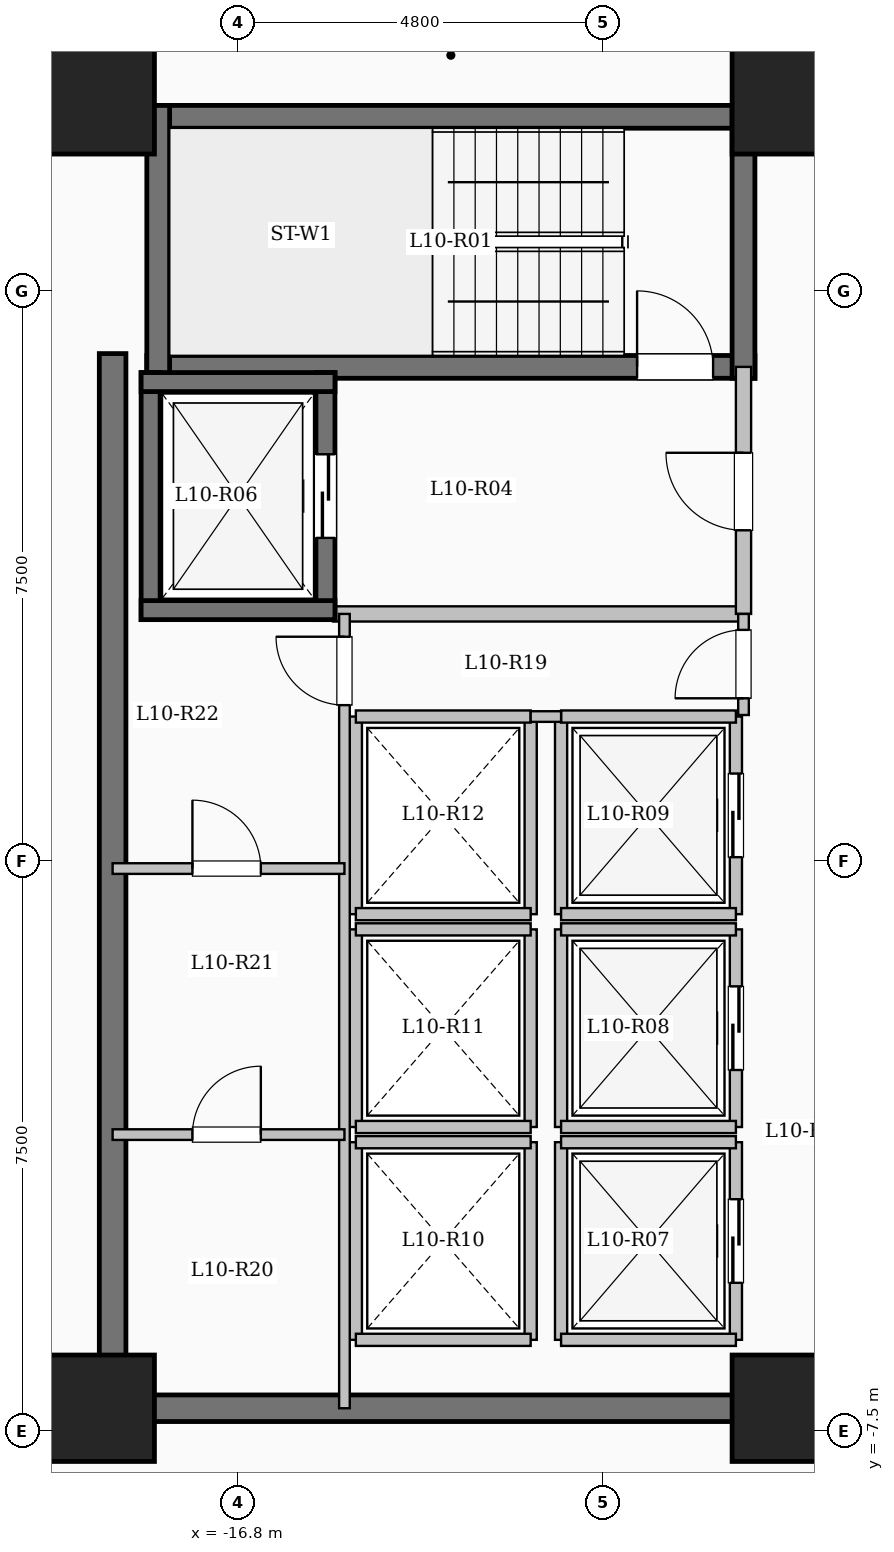
"""IFC4 building model, lengths in metres.
Left out: names, types, materials, properties, quantities, classifications, styles, units other than length and angle.
Written with IfcOpenShell. Run it as: python <this file> out.ifc"""

import sys

from ifc_helpers import new_model, si_unit, direction, frame, frame_2d, origin, origin_2d, place, context, subcontext, project, spatial, rectangle, extrude, element, fill, save


model = new_model("IFC4")
c1 = context("Model", 3, precision=1e-05, world=origin(), true_north=direction((0.0, 1.0)))
c2 = subcontext(c1, "Body", "Model", "MODEL_VIEW")
j1 = project(units=[si_unit("LENGTHUNIT", "METRE"), si_unit("PLANEANGLEUNIT", "RADIAN")], contexts=[c1])
p1 = place(None, origin())
s1 = spatial("IfcSite", under=j1, at=p1, CompositionType="ELEMENT")
p2 = place(p1, origin())
s2 = spatial("IfcBuilding", under=s1, at=p2, CompositionType="ELEMENT")
p3 = place(p2, frame((0.0, 0.0, 40.75)))
s3 = spatial("IfcBuildingStorey", under=s2, at=p3, CompositionType="ELEMENT", Elevation=40.75)
for number, where, z_axis, x_axis in (
    (1, (-9.6, -7.2, 0.0), (0.0, 0.0, 1.0), (1.0, 0.0, 0.0)),
    (2, (-9.6, 10.0, 0.0), (0.0, 0.0, 1.0), (1.0, 0.0, 0.0)),
    (3, (-18.6, -7.2, 0.0), (0.0, 0.0, 1.0), (1.0, 0.0, 0.0)),
    (4, (-18.6, 10.0, 0.0), (0.0, 0.0, 1.0), (1.0, 0.0, 0.0)),
):
    element("IfcColumn", number, at=place(p3, frame(where, z_axis=z_axis, x_axis=x_axis)), inside=s3, PredefinedType="COLUMN", context=c2, shape_type="SweptSolid", body=[
        extrude(rectangle(XDim=1.4, YDim=1.4, at=origin_2d()), origin(), (0.0, 0.0, 1.0), 3.35),
    ])
p4 = place(p3, frame((-18.0, 9.79, 0.0), z_axis=(0.0, 0.0, 1.0), x_axis=(1.0, 0.0, 0.0)))
e5 = element("IfcWall", 5, at=p4, inside=s3, PredefinedType="SHEAR", context=c2, shape_type="SweptSolid", body=[
    extrude(rectangle(XDim=8.0, YDim=0.3, at=frame_2d((4.0, 0.0))), origin(), (0.0, 0.0, 1.0), 3.35),
])
p5 = place(p3, frame((-18.0, 6.5, 0.0), z_axis=(0.0, 0.0, 1.0), x_axis=(1.0, 0.0, 0.0)))
e6 = element("IfcWall", 6, at=p5, inside=s3, PredefinedType="SHEAR", context=c2, shape_type="SweptSolid", body=[
    extrude(rectangle(XDim=8.0, YDim=0.3, at=frame_2d((4.0, 0.0))), origin(), (0.0, 0.0, 1.0), 3.35),
])
p6 = place(p5, frame((6.45, 0.0, 0.0)))
e7 = element("IfcOpeningElement", 7, at=p6, cuts=e6, PredefinedType="OPENING", context=c2, shape_type="SweptSolid", body=[
    extrude(rectangle(XDim=1.0, YDim=2.15, at=frame_2d((0.5, 1.075))), frame((0.0, 0.16, 0.0), z_axis=(0.0, -1.0, 0.0), x_axis=(1.0, 0.0, 0.0)), (0.0, 0.0, 1.0), 0.32),
])
for number, where, z_axis, x_axis in (
    (8, (-17.85, 6.35, 0.0), (0.0, 0.0, 1.0), (0.0, 1.0, 0.0)),
    (9, (-10.15, 6.35, 0.0), (0.0, 0.0, 1.0), (0.0, 1.0, 0.0)),
):
    element("IfcWall", number, at=place(p3, frame(where, z_axis=z_axis, x_axis=x_axis)), inside=s3, PredefinedType="SHEAR", context=c2, shape_type="SweptSolid", body=[
        extrude(rectangle(XDim=3.59, YDim=0.3, at=frame_2d((1.795, 0.0))), origin(), (0.0, 0.0, 1.0), 3.35),
    ])
p7 = place(p3, frame((-15.55, 3.25, 0.0), z_axis=(0.0, 0.0, 1.0), x_axis=(1.0, 0.0, 0.0)))
e10 = element("IfcWall", 10, at=p7, inside=s3, PredefinedType="SOLIDWALL", context=c2, shape_type="SweptSolid", body=[
    extrude(rectangle(XDim=5.4, YDim=0.2, at=frame_2d((2.7, 0.0))), origin(), (0.0, 0.0, 1.0), 3.1),
])
p8 = place(p3, frame((-10.15, 3.25, 0.0), z_axis=(0.0, 0.0, 1.0), x_axis=(0.0, 1.0, 0.0)))
e11 = element("IfcWall", 11, at=p8, inside=s3, PredefinedType="SOLIDWALL", context=c2, shape_type="SweptSolid", body=[
    extrude(rectangle(XDim=3.25, YDim=0.2, at=frame_2d((1.625, 0.0))), origin(), (0.0, 0.0, 1.0), 3.1),
])
p9 = place(p8, frame((1.1, 0.0, 0.0)))
e12 = element("IfcOpeningElement", 12, at=p9, cuts=e11, PredefinedType="OPENING", context=c2, shape_type="SweptSolid", body=[
    extrude(rectangle(XDim=1.02, YDim=2.15, at=frame_2d((0.51, 1.075))), frame((0.0, 0.11, 0.0), z_axis=(0.0, -1.0, 0.0), x_axis=(1.0, 0.0, 0.0)), (0.0, 0.0, 1.0), 0.22),
])
p10 = place(p3, frame((-17.95, 3.175, 0.0), z_axis=(0.0, 0.0, 1.0), x_axis=(0.0, 1.0, 0.0)))
e13 = element("IfcWall", 13, at=p10, inside=s3, PredefinedType="SHEAR", context=c2, shape_type="SweptSolid", body=[
    extrude(rectangle(XDim=3.25, YDim=0.25, at=frame_2d((1.625, 0.0))), origin(), (0.0, 0.0, 1.0), 3.35),
])
p11 = place(p3, frame((-15.65, 3.175, 0.0), z_axis=(0.0, 0.0, 1.0), x_axis=(0.0, 1.0, 0.0)))
e14 = element("IfcWall", 14, at=p11, inside=s3, PredefinedType="SHEAR", context=c2, shape_type="SweptSolid", body=[
    extrude(rectangle(XDim=3.25, YDim=0.25, at=frame_2d((1.625, 0.0))), origin(), (0.0, 0.0, 1.0), 3.35),
])
p12 = place(p11, frame((1.075, 0.0, 0.0)))
e15 = element("IfcOpeningElement", 15, at=p12, cuts=e14, PredefinedType="OPENING", context=c2, shape_type="SweptSolid", body=[
    extrude(rectangle(XDim=1.1, YDim=2.15, at=frame_2d((0.55, 1.075))), frame((0.0, 0.135, 0.0), z_axis=(0.0, -1.0, 0.0), x_axis=(1.0, 0.0, 0.0)), (0.0, 0.0, 1.0), 0.27),
])
for number, where, z_axis, x_axis in (
    (16, (-18.075, 3.3, 0.0), (0.0, 0.0, 1.0), (1.0, 0.0, 0.0)),
    (17, (-18.075, 6.3, 0.0), (0.0, 0.0, 1.0), (1.0, 0.0, 0.0)),
):
    element("IfcWall", number, at=place(p3, frame(where, z_axis=z_axis, x_axis=x_axis)), inside=s3, PredefinedType="SHEAR", context=c2, shape_type="SweptSolid", body=[
        extrude(rectangle(XDim=2.55, YDim=0.25, at=frame_2d((1.275, 0.0))), origin(), (0.0, 0.0, 1.0), 3.35),
    ])
p13 = place(p3, frame((-12.55, -6.3, 0.0), z_axis=(0.0, 0.0, 1.0), x_axis=(0.0, 1.0, 0.0)))
e18 = element("IfcWall", 18, at=p13, inside=s3, PredefinedType="SOLIDWALL", context=c2, shape_type="SweptSolid", body=[
    extrude(rectangle(XDim=2.6, YDim=0.16, at=frame_2d((1.3, 0.0))), origin(), (0.0, 0.0, 1.0), 3.1),
])
p14 = place(p3, frame((-10.25, -6.3, 0.0), z_axis=(0.0, 0.0, 1.0), x_axis=(0.0, 1.0, 0.0)))
e19 = element("IfcWall", 19, at=p14, inside=s3, PredefinedType="SOLIDWALL", context=c2, shape_type="SweptSolid", body=[
    extrude(rectangle(XDim=2.6, YDim=0.16, at=frame_2d((1.3, 0.0))), origin(), (0.0, 0.0, 1.0), 3.1),
])
p15 = place(p14, frame((0.75, 0.0, 0.0)))
e20 = element("IfcOpeningElement", 20, at=p15, cuts=e19, PredefinedType="OPENING", context=c2, shape_type="SweptSolid", body=[
    extrude(rectangle(XDim=1.1, YDim=2.15, at=frame_2d((0.55, 1.075))), frame((0.0, 0.09, 0.0), z_axis=(0.0, -1.0, 0.0), x_axis=(1.0, 0.0, 0.0)), (0.0, 0.0, 1.0), 0.18),
])
for number, where, z_axis, x_axis in (
    (21, (-12.55, -6.3, 0.0), (0.0, 0.0, 1.0), (1.0, 0.0, 0.0)),
    (22, (-12.55, -3.7, 0.0), (0.0, 0.0, 1.0), (1.0, 0.0, 0.0)),
):
    element("IfcWall", number, at=place(p3, frame(where, z_axis=z_axis, x_axis=x_axis)), inside=s3, PredefinedType="SOLIDWALL", context=c2, shape_type="SweptSolid", body=[
        extrude(rectangle(XDim=2.3, YDim=0.16, at=frame_2d((1.15, 0.0))), origin(), (0.0, 0.0, 1.0), 3.1),
    ])
p16 = place(p3, frame((-12.55, -3.5, 0.0), z_axis=(0.0, 0.0, 1.0), x_axis=(0.0, 1.0, 0.0)))
e23 = element("IfcWall", 23, at=p16, inside=s3, PredefinedType="SOLIDWALL", context=c2, shape_type="SweptSolid", body=[
    extrude(rectangle(XDim=2.6, YDim=0.16, at=frame_2d((1.3, 0.0))), origin(), (0.0, 0.0, 1.0), 3.1),
])
p17 = place(p3, frame((-10.25, -3.5, 0.0), z_axis=(0.0, 0.0, 1.0), x_axis=(0.0, 1.0, 0.0)))
e24 = element("IfcWall", 24, at=p17, inside=s3, PredefinedType="SOLIDWALL", context=c2, shape_type="SweptSolid", body=[
    extrude(rectangle(XDim=2.6, YDim=0.16, at=frame_2d((1.3, 0.0))), origin(), (0.0, 0.0, 1.0), 3.1),
])
p18 = place(p17, frame((0.75, 0.0, 0.0)))
e25 = element("IfcOpeningElement", 25, at=p18, cuts=e24, PredefinedType="OPENING", context=c2, shape_type="SweptSolid", body=[
    extrude(rectangle(XDim=1.1, YDim=2.15, at=frame_2d((0.55, 1.075))), frame((0.0, 0.09, 0.0), z_axis=(0.0, -1.0, 0.0), x_axis=(1.0, 0.0, 0.0)), (0.0, 0.0, 1.0), 0.18),
])
for number, where, z_axis, x_axis in (
    (26, (-12.55, -3.5, 0.0), (0.0, 0.0, 1.0), (1.0, 0.0, 0.0)),
    (27, (-12.55, -0.9, 0.0), (0.0, 0.0, 1.0), (1.0, 0.0, 0.0)),
):
    element("IfcWall", number, at=place(p3, frame(where, z_axis=z_axis, x_axis=x_axis)), inside=s3, PredefinedType="SOLIDWALL", context=c2, shape_type="SweptSolid", body=[
        extrude(rectangle(XDim=2.3, YDim=0.16, at=frame_2d((1.15, 0.0))), origin(), (0.0, 0.0, 1.0), 3.1),
    ])
p19 = place(p3, frame((-12.55, -0.7, 0.0), z_axis=(0.0, 0.0, 1.0), x_axis=(0.0, 1.0, 0.0)))
e28 = element("IfcWall", 28, at=p19, inside=s3, PredefinedType="SOLIDWALL", context=c2, shape_type="SweptSolid", body=[
    extrude(rectangle(XDim=2.6, YDim=0.16, at=frame_2d((1.3, 0.0))), origin(), (0.0, 0.0, 1.0), 3.1),
])
p20 = place(p3, frame((-10.25, -0.7, 0.0), z_axis=(0.0, 0.0, 1.0), x_axis=(0.0, 1.0, 0.0)))
e29 = element("IfcWall", 29, at=p20, inside=s3, PredefinedType="SOLIDWALL", context=c2, shape_type="SweptSolid", body=[
    extrude(rectangle(XDim=2.6, YDim=0.16, at=frame_2d((1.3, 0.0))), origin(), (0.0, 0.0, 1.0), 3.1),
])
p21 = place(p20, frame((0.75, 0.0, 0.0)))
e30 = element("IfcOpeningElement", 30, at=p21, cuts=e29, PredefinedType="OPENING", context=c2, shape_type="SweptSolid", body=[
    extrude(rectangle(XDim=1.1, YDim=2.15, at=frame_2d((0.55, 1.075))), frame((0.0, 0.09, 0.0), z_axis=(0.0, -1.0, 0.0), x_axis=(1.0, 0.0, 0.0)), (0.0, 0.0, 1.0), 0.18),
])
for number, where, z_axis, x_axis in (
    (31, (-12.55, -0.7, 0.0), (0.0, 0.0, 1.0), (1.0, 0.0, 0.0)),
    (32, (-12.55, 1.9, 0.0), (0.0, 0.0, 1.0), (1.0, 0.0, 0.0)),
):
    element("IfcWall", number, at=place(p3, frame(where, z_axis=z_axis, x_axis=x_axis)), inside=s3, PredefinedType="SOLIDWALL", context=c2, shape_type="SweptSolid", body=[
        extrude(rectangle(XDim=2.3, YDim=0.16, at=frame_2d((1.15, 0.0))), origin(), (0.0, 0.0, 1.0), 3.1),
    ])
for number, where, z_axis, x_axis in (
    (33, (-15.25, -6.3, 0.0), (0.0, 0.0, 1.0), (0.0, 1.0, 0.0)),
    (34, (-12.95, -6.3, 0.0), (0.0, 0.0, 1.0), (0.0, 1.0, 0.0)),
):
    element("IfcWall", number, at=place(p3, frame(where, z_axis=z_axis, x_axis=x_axis)), inside=s3, PredefinedType="SOLIDWALL", context=c2, shape_type="SweptSolid", body=[
        extrude(rectangle(XDim=2.6, YDim=0.16, at=frame_2d((1.3, 0.0))), origin(), (0.0, 0.0, 1.0), 3.1),
    ])
for number, where, z_axis, x_axis in (
    (35, (-15.25, -6.3, 0.0), (0.0, 0.0, 1.0), (1.0, 0.0, 0.0)),
    (36, (-15.25, -3.7, 0.0), (0.0, 0.0, 1.0), (1.0, 0.0, 0.0)),
):
    element("IfcWall", number, at=place(p3, frame(where, z_axis=z_axis, x_axis=x_axis)), inside=s3, PredefinedType="SOLIDWALL", context=c2, shape_type="SweptSolid", body=[
        extrude(rectangle(XDim=2.3, YDim=0.16, at=frame_2d((1.15, 0.0))), origin(), (0.0, 0.0, 1.0), 3.1),
    ])
for number, where, z_axis, x_axis in (
    (37, (-15.25, -3.5, 0.0), (0.0, 0.0, 1.0), (0.0, 1.0, 0.0)),
    (38, (-12.95, -3.5, 0.0), (0.0, 0.0, 1.0), (0.0, 1.0, 0.0)),
):
    element("IfcWall", number, at=place(p3, frame(where, z_axis=z_axis, x_axis=x_axis)), inside=s3, PredefinedType="SOLIDWALL", context=c2, shape_type="SweptSolid", body=[
        extrude(rectangle(XDim=2.6, YDim=0.16, at=frame_2d((1.3, 0.0))), origin(), (0.0, 0.0, 1.0), 3.1),
    ])
for number, where, z_axis, x_axis in (
    (39, (-15.25, -3.5, 0.0), (0.0, 0.0, 1.0), (1.0, 0.0, 0.0)),
    (40, (-15.25, -0.9, 0.0), (0.0, 0.0, 1.0), (1.0, 0.0, 0.0)),
):
    element("IfcWall", number, at=place(p3, frame(where, z_axis=z_axis, x_axis=x_axis)), inside=s3, PredefinedType="SOLIDWALL", context=c2, shape_type="SweptSolid", body=[
        extrude(rectangle(XDim=2.3, YDim=0.16, at=frame_2d((1.15, 0.0))), origin(), (0.0, 0.0, 1.0), 3.1),
    ])
for number, where, z_axis, x_axis in (
    (41, (-15.25, -0.7, 0.0), (0.0, 0.0, 1.0), (0.0, 1.0, 0.0)),
    (42, (-12.95, -0.7, 0.0), (0.0, 0.0, 1.0), (0.0, 1.0, 0.0)),
):
    element("IfcWall", number, at=place(p3, frame(where, z_axis=z_axis, x_axis=x_axis)), inside=s3, PredefinedType="SOLIDWALL", context=c2, shape_type="SweptSolid", body=[
        extrude(rectangle(XDim=2.6, YDim=0.16, at=frame_2d((1.3, 0.0))), origin(), (0.0, 0.0, 1.0), 3.1),
    ])
for number, where, z_axis, x_axis in (
    (43, (-15.25, -0.7, 0.0), (0.0, 0.0, 1.0), (1.0, 0.0, 0.0)),
    (44, (-15.25, 1.9, 0.0), (0.0, 0.0, 1.0), (1.0, 0.0, 0.0)),
):
    element("IfcWall", number, at=place(p3, frame(where, z_axis=z_axis, x_axis=x_axis)), inside=s3, PredefinedType="SOLIDWALL", context=c2, shape_type="SweptSolid", body=[
        extrude(rectangle(XDim=2.3, YDim=0.16, at=frame_2d((1.15, 0.0))), origin(), (0.0, 0.0, 1.0), 3.1),
    ])
p22 = place(p3, frame((-18.45, -7.375, 0.0), z_axis=(0.0, 0.0, 1.0), x_axis=(0.0, 1.0, 0.0)))
e45 = element("IfcWall", 45, at=p22, inside=s3, PredefinedType="SHEAR", context=c2, shape_type="SweptSolid", body=[
    extrude(rectangle(XDim=14.05, YDim=0.35, at=frame_2d((7.025, 0.0))), origin(), (0.0, 0.0, 1.0), 3.35),
])
p23 = place(p3, frame((-18.625, -7.2, 0.0), z_axis=(0.0, 0.0, 1.0), x_axis=(1.0, 0.0, 0.0)))
e46 = element("IfcWall", 46, at=p23, inside=s3, PredefinedType="SHEAR", context=c2, shape_type="SweptSolid", body=[
    extrude(rectangle(XDim=8.55, YDim=0.35, at=frame_2d((4.275, 0.0))), origin(), (0.0, 0.0, 1.0), 3.35),
])
p24 = place(p3, frame((-12.95, 1.9, 0.0), z_axis=(0.0, 0.0, 1.0), x_axis=(1.0, 0.0, 0.0)))
e47 = element("IfcWall", 47, at=p24, inside=s3, PredefinedType="PARTITIONING", context=c2, shape_type="SweptSolid", body=[
    extrude(rectangle(XDim=0.4, YDim=0.14, at=frame_2d((0.2, 0.0))), origin(), (0.0, 0.0, 1.0), 3.1),
])
p25 = place(p3, frame((-10.15, 1.92, 0.0), z_axis=(0.0, 0.0, 1.0), x_axis=(0.0, 1.0, 0.0)))
e48 = element("IfcWall", 48, at=p25, inside=s3, PredefinedType="PARTITIONING", context=c2, shape_type="SweptSolid", body=[
    extrude(rectangle(XDim=1.33, YDim=0.14, at=frame_2d((0.665, 0.0))), origin(), (0.0, 0.0, 1.0), 3.1),
])
p26 = place(p25, frame((0.22, 0.0, 0.0)))
e49 = element("IfcOpeningElement", 49, at=p26, cuts=e48, PredefinedType="OPENING", context=c2, shape_type="SweptSolid", body=[
    extrude(rectangle(XDim=0.9, YDim=2.08, at=frame_2d((0.45, 1.04))), frame((0.0, 0.08, 0.0), z_axis=(0.0, -1.0, 0.0), x_axis=(1.0, 0.0, 0.0)), (0.0, 0.0, 1.0), 0.16),
])
p27 = place(p3, frame((-15.4, -7.2, 0.0), z_axis=(0.0, 0.0, 1.0), x_axis=(0.0, 1.0, 0.0)))
e50 = element("IfcWall", 50, at=p27, inside=s3, PredefinedType="PARTITIONING", context=c2, shape_type="SweptSolid", body=[
    extrude(rectangle(XDim=10.45, YDim=0.14, at=frame_2d((5.225, 0.0))), origin(), (0.0, 0.0, 1.0), 3.1),
])
p28 = place(p27, frame((9.25, 0.0, 0.0)))
e51 = element("IfcOpeningElement", 51, at=p28, cuts=e50, PredefinedType="OPENING", context=c2, shape_type="SweptSolid", body=[
    extrude(rectangle(XDim=0.9, YDim=2.08, at=frame_2d((0.45, 1.04))), frame((0.0, 0.08, 0.0), z_axis=(0.0, -1.0, 0.0), x_axis=(1.0, 0.0, 0.0)), (0.0, 0.0, 1.0), 0.16),
])
p29 = place(p3, frame((-18.45, -3.6, 0.0), z_axis=(0.0, 0.0, 1.0), x_axis=(1.0, 0.0, 0.0)))
e52 = element("IfcWall", 52, at=p29, inside=s3, PredefinedType="PARTITIONING", context=c2, shape_type="SweptSolid", body=[
    extrude(rectangle(XDim=3.05, YDim=0.14, at=frame_2d((1.525, 0.0))), origin(), (0.0, 0.0, 1.0), 3.1),
])
p30 = place(p29, frame((1.05, 0.0, 0.0)))
e53 = element("IfcOpeningElement", 53, at=p30, cuts=e52, PredefinedType="OPENING", context=c2, shape_type="SweptSolid", body=[
    extrude(rectangle(XDim=0.9, YDim=2.08, at=frame_2d((0.45, 1.04))), frame((0.0, 0.08, 0.0), z_axis=(0.0, -1.0, 0.0), x_axis=(1.0, 0.0, 0.0)), (0.0, 0.0, 1.0), 0.16),
])
p31 = place(p3, frame((-18.45, -0.1, 0.0), z_axis=(0.0, 0.0, 1.0), x_axis=(1.0, 0.0, 0.0)))
e54 = element("IfcWall", 54, at=p31, inside=s3, PredefinedType="PARTITIONING", context=c2, shape_type="SweptSolid", body=[
    extrude(rectangle(XDim=3.05, YDim=0.14, at=frame_2d((1.525, 0.0))), origin(), (0.0, 0.0, 1.0), 3.1),
])
p32 = place(p31, frame((1.05, 0.0, 0.0)))
e55 = element("IfcOpeningElement", 55, at=p32, cuts=e54, PredefinedType="OPENING", context=c2, shape_type="SweptSolid", body=[
    extrude(rectangle(XDim=0.9, YDim=2.08, at=frame_2d((0.45, 1.04))), frame((0.0, 0.08, 0.0), z_axis=(0.0, -1.0, 0.0), x_axis=(1.0, 0.0, 0.0)), (0.0, 0.0, 1.0), 0.16),
])
p33 = place(p3, frame((-28.68, -7.25, 0.0), z_axis=(0.0, 0.0, 1.0), x_axis=(1.0, 0.0, 0.0)))
e56 = element("IfcWall", 56, at=p33, inside=s3, PredefinedType="PARTITIONING", context=c2, shape_type="SweptSolid", body=[
    extrude(rectangle(XDim=10.23, YDim=0.15, at=frame_2d((5.115, 0.0))), origin(), (0.0, 0.0, 1.0), 3.1),
])
p34 = place(p33, frame((7.03, 0.0, 0.0)))
e57 = element("IfcOpeningElement", 57, at=p34, cuts=e56, PredefinedType="OPENING", context=c2, shape_type="SweptSolid", body=[
    extrude(rectangle(XDim=1.08, YDim=2.15, at=frame_2d((0.54, 1.075))), frame((0.0, 0.085, 0.0), z_axis=(0.0, -1.0, 0.0), x_axis=(1.0, 0.0, 0.0)), (0.0, 0.0, 1.0), 0.17),
])
p35 = place(p6, origin())
e58 = element("IfcDoor", 58, at=p35, inside=s3, OperationType="SINGLE_SWING_LEFT", PredefinedType="DOOR", context=c2, shape_type="SweptSolid", body=[
    extrude(rectangle(XDim=1.0, YDim=2.15, at=frame_2d((0.5, 1.075))), frame((0.0, 0.025, 0.0), z_axis=(0.0, -1.0, 0.0), x_axis=(1.0, 0.0, 0.0)), (0.0, 0.0, 1.0), 0.05),
])
fill(e7, e58)
p36 = place(p9, origin())
e59 = element("IfcDoor", 59, at=p36, inside=s3, OperationType="SINGLE_SWING_RIGHT", PredefinedType="DOOR", context=c2, shape_type="SweptSolid", body=[
    extrude(rectangle(XDim=1.02, YDim=2.15, at=frame_2d((0.51, 1.075))), frame((0.0, 0.025, 0.0), z_axis=(0.0, -1.0, 0.0), x_axis=(1.0, 0.0, 0.0)), (0.0, 0.0, 1.0), 0.05),
])
fill(e12, e59)
p37 = place(p12, origin())
e60 = element("IfcDoor", 60, at=p37, inside=s3, OperationType="SLIDING_TO_LEFT", PredefinedType="DOOR", context=c2, shape_type="SweptSolid", body=[
    extrude(rectangle(XDim=1.1, YDim=2.15, at=frame_2d((0.55, 1.075))), frame((0.0, 0.025, 0.0), z_axis=(0.0, -1.0, 0.0), x_axis=(1.0, 0.0, 0.0)), (0.0, 0.0, 1.0), 0.05),
])
fill(e15, e60)
p38 = place(p15, origin())
e61 = element("IfcDoor", 61, at=p38, inside=s3, OperationType="SLIDING_TO_LEFT", PredefinedType="DOOR", context=c2, shape_type="SweptSolid", body=[
    extrude(rectangle(XDim=1.1, YDim=2.15, at=frame_2d((0.55, 1.075))), frame((0.0, 0.025, 0.0), z_axis=(0.0, -1.0, 0.0), x_axis=(1.0, 0.0, 0.0)), (0.0, 0.0, 1.0), 0.05),
])
fill(e20, e61)
p39 = place(p18, origin())
e62 = element("IfcDoor", 62, at=p39, inside=s3, OperationType="SLIDING_TO_LEFT", PredefinedType="DOOR", context=c2, shape_type="SweptSolid", body=[
    extrude(rectangle(XDim=1.1, YDim=2.15, at=frame_2d((0.55, 1.075))), frame((0.0, 0.025, 0.0), z_axis=(0.0, -1.0, 0.0), x_axis=(1.0, 0.0, 0.0)), (0.0, 0.0, 1.0), 0.05),
])
fill(e25, e62)
p40 = place(p21, origin())
e63 = element("IfcDoor", 63, at=p40, inside=s3, OperationType="SLIDING_TO_LEFT", PredefinedType="DOOR", context=c2, shape_type="SweptSolid", body=[
    extrude(rectangle(XDim=1.1, YDim=2.15, at=frame_2d((0.55, 1.075))), frame((0.0, 0.025, 0.0), z_axis=(0.0, -1.0, 0.0), x_axis=(1.0, 0.0, 0.0)), (0.0, 0.0, 1.0), 0.05),
])
fill(e30, e63)
p41 = place(p26, origin())
e64 = element("IfcDoor", 64, at=p41, inside=s3, OperationType="SINGLE_SWING_LEFT", PredefinedType="DOOR", context=c2, shape_type="SweptSolid", body=[
    extrude(rectangle(XDim=0.9, YDim=2.08, at=frame_2d((0.45, 1.04))), frame((0.0, 0.025, 0.0), z_axis=(0.0, -1.0, 0.0), x_axis=(1.0, 0.0, 0.0)), (0.0, 0.0, 1.0), 0.05),
])
fill(e49, e64)
p42 = place(p28, origin())
e65 = element("IfcDoor", 65, at=p42, inside=s3, OperationType="SINGLE_SWING_RIGHT", PredefinedType="DOOR", context=c2, shape_type="SweptSolid", body=[
    extrude(rectangle(XDim=0.9, YDim=2.08, at=frame_2d((0.45, 1.04))), frame((0.0, 0.025, 0.0), z_axis=(0.0, -1.0, 0.0), x_axis=(1.0, 0.0, 0.0)), (0.0, 0.0, 1.0), 0.05),
])
fill(e51, e65)
p43 = place(p32, origin())
e66 = element("IfcDoor", 66, at=p43, inside=s3, OperationType="SINGLE_SWING_LEFT", PredefinedType="DOOR", context=c2, shape_type="SweptSolid", body=[
    extrude(rectangle(XDim=0.9, YDim=2.08, at=frame_2d((0.45, 1.04))), frame((0.0, 0.025, 0.0), z_axis=(0.0, -1.0, 0.0), x_axis=(1.0, 0.0, 0.0)), (0.0, 0.0, 1.0), 0.05),
])
fill(e55, e66)
p44 = place(p30, origin())
e67 = element("IfcDoor", 67, at=p44, inside=s3, OperationType="SINGLE_SWING_RIGHT", PredefinedType="DOOR", context=c2, shape_type="SweptSolid", body=[
    extrude(rectangle(XDim=0.9, YDim=2.08, at=frame_2d((0.45, 1.04))), frame((0.0, 0.025, 0.0), z_axis=(0.0, -1.0, 0.0), x_axis=(1.0, 0.0, 0.0)), (0.0, 0.0, 1.0), 0.05),
])
fill(e53, e67)
save(model, sys.argv[1])
